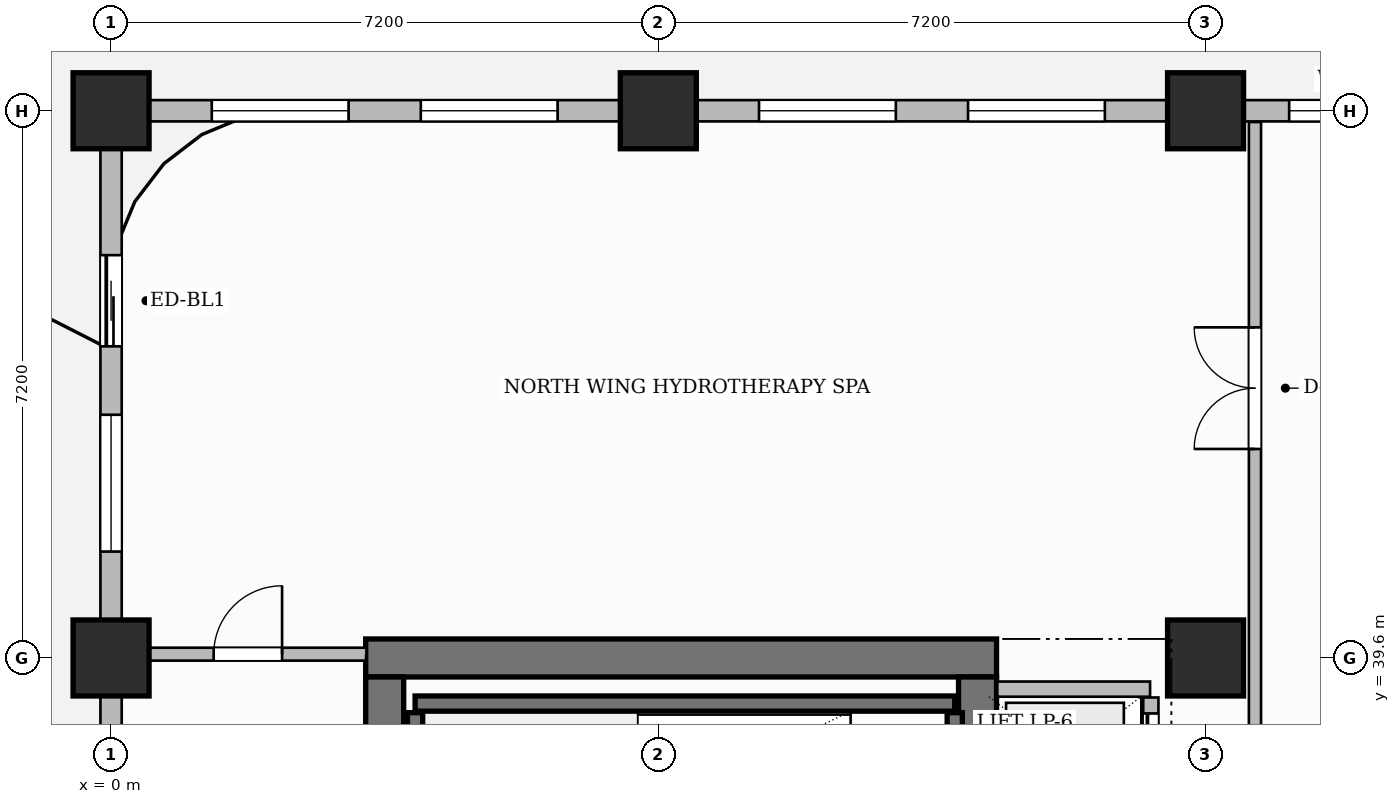
"""IFC4 building model, lengths in metres.
Left out: names, types, materials, properties, quantities, classifications, styles, units other than length and angle.
Written with IfcOpenShell. Run it as: python <this file> out.ifc"""

import sys

from ifc_helpers import new_model, si_unit, direction, frame, frame_2d, origin, origin_2d, place, context, subcontext, project, spatial, rectangle, extrude, source, transform, mapped, element, fill, save


model = new_model("IFC4")
c1 = context("Model", 3, precision=1e-05, world=origin(), true_north=direction((0.0, 1.0)))
c2 = subcontext(c1, "Body", "Model", "MODEL_VIEW")
j1 = project(units=[si_unit("LENGTHUNIT", "METRE"), si_unit("PLANEANGLEUNIT", "RADIAN")], contexts=[c1])
p1 = place(None, origin())
s1 = spatial("IfcSite", under=j1, at=p1, CompositionType="ELEMENT")
p2 = place(p1, origin())
s2 = spatial("IfcBuilding", under=s1, at=p2, CompositionType="ELEMENT")
p3 = place(p2, frame((0.0, 0.0, 150.3)))
s3 = spatial("IfcBuildingStorey", under=s2, at=p3, CompositionType="ELEMENT", Elevation=150.3)
p4 = place(p3, frame((3.35, 39.6, 0.0), z_axis=(0.0, 0.0, 1.0), x_axis=(1.0, 0.0, 0.0)))
e1 = element("IfcWall", 1, at=p4, inside=s3, PredefinedType="SHEAR", context=c2, shape_type="SweptSolid", body=[
    extrude(rectangle(XDim=8.3, YDim=0.5, at=frame_2d((4.15, 0.0))), origin(), (0.0, 0.0, 1.0), 3.85),
])
p5 = place(p3, frame((3.6, 25.45, 0.0), z_axis=(0.0, 0.0, 1.0), x_axis=(0.0, 1.0, 0.0)))
e2 = element("IfcWall", 2, at=p5, inside=s3, PredefinedType="SHEAR", context=c2, shape_type="SweptSolid", body=[
    extrude(rectangle(XDim=13.9, YDim=0.5, at=frame_2d((6.95, 0.0))), origin(), (0.0, 0.0, 1.0), 3.85),
])
p6 = place(p3, frame((11.4, 25.45, 0.0), z_axis=(0.0, 0.0, 1.0), x_axis=(0.0, 1.0, 0.0)))
e3 = element("IfcWall", 3, at=p6, inside=s3, PredefinedType="SHEAR", context=c2, shape_type="SweptSolid", body=[
    extrude(rectangle(XDim=13.9, YDim=0.5, at=frame_2d((6.95, 0.0))), origin(), (0.0, 0.0, 1.0), 3.85),
])
p7 = place(p6, frame((6.52, 0.0, 0.0)))
e4 = element("IfcOpeningElement", 4, at=p7, cuts=e3, PredefinedType="OPENING", context=c2, shape_type="SweptSolid", body=[
    extrude(rectangle(XDim=1.5, YDim=2.2, at=frame_2d((0.75, 1.1))), frame((0.0, 0.26, 0.0), z_axis=(0.0, -1.0, 0.0), x_axis=(1.0, 0.0, 0.0)), (0.0, 0.0, 1.0), 0.52),
])
m1 = source(origin(), c2, "Body", "SweptSolid", [
    extrude(rectangle(XDim=1.0, YDim=1.0, at=origin_2d()), origin(), (0.0, 0.0, 1.0), 3.85),
])
for number, where, z_axis, x_axis in (
    (5, (0.0, 39.6, 0.0), (0.0, 0.0, 1.0), (1.0, 0.0, 0.0)),
    (6, (0.0, 46.8, 0.0), (0.0, 0.0, 1.0), (1.0, 0.0, 0.0)),
    (7, (7.2, 46.8, 0.0), (0.0, 0.0, 1.0), (1.0, 0.0, 0.0)),
    (8, (14.4, 39.6, 0.0), (0.0, 0.0, 1.0), (1.0, 0.0, 0.0)),
    (9, (14.4, 46.8, 0.0), (0.0, 0.0, 1.0), (1.0, 0.0, 0.0)),
):
    element("IfcColumn", number, at=place(p3, frame(where, z_axis=z_axis, x_axis=x_axis)), inside=s3, PredefinedType="COLUMN", context=c2, shape_type="MappedRepresentation", body=[
        mapped(m1, transform((0.0, 0.0, 0.0), scale=1.0)),
    ])
p8 = place(p3, frame((4.0, 39.0, 0.0), z_axis=(0.0, 0.0, 1.0), x_axis=(1.0, 0.0, 0.0)))
e10 = element("IfcWall", 10, at=p8, inside=s3, PredefinedType="SHEAR", context=c2, shape_type="SweptSolid", body=[
    extrude(rectangle(XDim=7.1, YDim=0.2, at=frame_2d((3.55, 0.0))), origin(), (0.0, 0.0, 1.0), 3.85),
])
for number, where, z_axis, x_axis in (
    (11, (4.0, 36.18, 0.0), (0.0, 0.0, 1.0), (0.0, 1.0, 0.0)),
    (12, (11.1, 36.18, 0.0), (0.0, 0.0, 1.0), (0.0, 1.0, 0.0)),
):
    element("IfcWall", number, at=place(p3, frame(where, z_axis=z_axis, x_axis=x_axis)), inside=s3, PredefinedType="SHEAR", context=c2, shape_type="SweptSolid", body=[
        extrude(rectangle(XDim=2.7, YDim=0.2, at=frame_2d((1.35, 0.0))), origin(), (0.0, 0.0, 1.0), 3.85),
    ])
p9 = place(p3, frame((11.66, 39.19, 0.0), z_axis=(0.0, 0.0, 1.0), x_axis=(1.0, 0.0, 0.0)))
e13 = element("IfcWall", 13, at=p9, inside=s3, PredefinedType="PARTITIONING", context=c2, shape_type="SweptSolid", body=[
    extrude(rectangle(XDim=2.01, YDim=0.2, at=frame_2d((1.005, 0.0))), origin(), (0.0, 0.0, 1.0), 3.6),
])
p10 = place(p3, frame((13.68, 34.36, 0.0), z_axis=(0.0, 0.0, 1.0), x_axis=(0.0, 1.0, 0.0)))
e14 = element("IfcWall", 14, at=p10, inside=s3, PredefinedType="PARTITIONING", context=c2, shape_type="SweptSolid", body=[
    extrude(rectangle(XDim=4.72, YDim=0.2, at=frame_2d((2.36, 0.0))), origin(), (0.0, 0.0, 1.0), 3.6),
])
p11 = place(p10, frame((0.21, 0.0, 0.0)))
e15 = element("IfcOpeningElement", 15, at=p11, cuts=e14, PredefinedType="OPENING", context=c2, shape_type="SweptSolid", body=[
    extrude(rectangle(XDim=1.1, YDim=2.2, at=frame_2d((0.55, 1.1))), frame((0.0, 0.11, 0.0), z_axis=(0.0, -1.0, 0.0), x_axis=(1.0, 0.0, 0.0)), (0.0, 0.0, 1.0), 0.22),
])
p12 = place(p10, frame((1.81, 0.0, 0.0)))
e16 = element("IfcOpeningElement", 16, at=p12, cuts=e14, PredefinedType="OPENING", context=c2, shape_type="SweptSolid", body=[
    extrude(rectangle(XDim=1.1, YDim=2.2, at=frame_2d((0.55, 1.1))), frame((0.0, 0.11, 0.0), z_axis=(0.0, -1.0, 0.0), x_axis=(1.0, 0.0, 0.0)), (0.0, 0.0, 1.0), 0.22),
])
p13 = place(p10, frame((3.41, 0.0, 0.0)))
e17 = element("IfcOpeningElement", 17, at=p13, cuts=e14, PredefinedType="OPENING", context=c2, shape_type="SweptSolid", body=[
    extrude(rectangle(XDim=1.1, YDim=2.2, at=frame_2d((0.55, 1.1))), frame((0.0, 0.11, 0.0), z_axis=(0.0, -1.0, 0.0), x_axis=(1.0, 0.0, 0.0)), (0.0, 0.0, 1.0), 0.22),
])
p14 = place(p3, frame((0.24, 39.65, 0.0), z_axis=(0.0, 0.0, 1.0), x_axis=(1.0, 0.0, 0.0)))
e18 = element("IfcWall", 18, at=p14, inside=s3, PredefinedType="PARTITIONING", context=c2, shape_type="SweptSolid", body=[
    extrude(rectangle(XDim=3.12, YDim=0.17, at=frame_2d((1.56, 0.0))), origin(), (0.0, 0.0, 1.0), 3.6),
])
p15 = place(p14, frame((1.11, 0.0, 0.0)))
e19 = element("IfcOpeningElement", 19, at=p15, cuts=e18, PredefinedType="OPENING", context=c2, shape_type="SweptSolid", body=[
    extrude(rectangle(XDim=0.9, YDim=2.15, at=frame_2d((0.45, 1.075))), frame((0.0, 0.095, 0.0), z_axis=(0.0, -1.0, 0.0), x_axis=(1.0, 0.0, 0.0)), (0.0, 0.0, 1.0), 0.19),
])
p16 = place(p3, frame((15.05, 34.34, 0.0), z_axis=(0.0, 0.0, 1.0), x_axis=(0.0, 1.0, 0.0)))
e20 = element("IfcWall", 20, at=p16, inside=s3, PredefinedType="PARTITIONING", context=c2, shape_type="SweptSolid", body=[
    extrude(rectangle(XDim=12.312, YDim=0.16, at=frame_2d((6.156, 0.0))), origin(), (0.0, 0.0, 1.0), 3.6),
])
p17 = place(p16, frame((8.01, 0.0, 0.0)))
e21 = element("IfcOpeningElement", 21, at=p17, cuts=e20, PredefinedType="OPENING", context=c2, shape_type="SweptSolid", body=[
    extrude(rectangle(XDim=1.6, YDim=2.4, at=frame_2d((0.8, 1.2))), frame((0.0, 0.09, 0.0), z_axis=(0.0, -1.0, 0.0), x_axis=(1.0, 0.0, 0.0)), (0.0, 0.0, 1.0), 0.18),
])
p18 = place(p3, frame((0.0, 25.25, 0.0), z_axis=(0.0, 0.0, 1.0), x_axis=(0.0, 1.0, 0.0)))
e22 = element("IfcWall", 22, at=p18, inside=s3, PredefinedType="SOLIDWALL", context=c2, shape_type="SweptSolid", body=[
    extrude(rectangle(XDim=21.5, YDim=0.28, at=frame_2d((10.75, 0.0))), origin(), (0.0, 0.0, 1.0), 3.085),
])
p19 = place(p18, frame((18.45, 0.0, 0.0)))
e23 = element("IfcOpeningElement", 23, at=p19, cuts=e22, PredefinedType="OPENING", context=c2, shape_type="SweptSolid", body=[
    extrude(rectangle(XDim=1.2, YDim=2.2, at=frame_2d((0.6, 1.1))), frame((0.0, 0.15, 0.0), z_axis=(0.0, -1.0, 0.0), x_axis=(1.0, 0.0, 0.0)), (0.0, 0.0, 1.0), 0.3),
])
p20 = place(p18, frame((0.8, 0.0, 0.0)))
e24 = element("IfcOpeningElement", 24, at=p20, cuts=e22, PredefinedType="OPENING", context=c2, shape_type="SweptSolid", body=[
    extrude(rectangle(XDim=1.2, YDim=2.2, at=frame_2d((0.6, 1.1))), frame((0.0, 0.15, 0.0), z_axis=(0.0, -1.0, 0.0), x_axis=(1.0, 0.0, 0.0)), (0.0, 0.0, 1.0), 0.3),
])
p21 = place(p18, frame((3.425, 0.0, 0.8)))
e25 = element("IfcOpeningElement", 25, at=p21, cuts=e22, PredefinedType="OPENING", context=c2, shape_type="SweptSolid", body=[
    extrude(rectangle(XDim=1.8, YDim=1.85, at=frame_2d((0.9, 0.925))), frame((0.0, 0.15, 0.0), z_axis=(0.0, -1.0, 0.0), x_axis=(1.0, 0.0, 0.0)), (0.0, 0.0, 1.0), 0.3),
])
p22 = place(p18, frame((8.475, 0.0, 0.8)))
e26 = element("IfcOpeningElement", 26, at=p22, cuts=e22, PredefinedType="OPENING", context=c2, shape_type="SweptSolid", body=[
    extrude(rectangle(XDim=1.8, YDim=1.85, at=frame_2d((0.9, 0.925))), frame((0.0, 0.15, 0.0), z_axis=(0.0, -1.0, 0.0), x_axis=(1.0, 0.0, 0.0)), (0.0, 0.0, 1.0), 0.3),
])
p23 = place(p18, frame((11.225, 0.0, 0.8)))
e27 = element("IfcOpeningElement", 27, at=p23, cuts=e22, PredefinedType="OPENING", context=c2, shape_type="SweptSolid", body=[
    extrude(rectangle(XDim=1.8, YDim=1.85, at=frame_2d((0.9, 0.925))), frame((0.0, 0.15, 0.0), z_axis=(0.0, -1.0, 0.0), x_axis=(1.0, 0.0, 0.0)), (0.0, 0.0, 1.0), 0.3),
])
p24 = place(p18, frame((15.75, 0.0, 0.8)))
e28 = element("IfcOpeningElement", 28, at=p24, cuts=e22, PredefinedType="OPENING", context=c2, shape_type="SweptSolid", body=[
    extrude(rectangle(XDim=1.8, YDim=1.85, at=frame_2d((0.9, 0.925))), frame((0.0, 0.15, 0.0), z_axis=(0.0, -1.0, 0.0), x_axis=(1.0, 0.0, 0.0)), (0.0, 0.0, 1.0), 0.3),
])
p25 = place(p3, frame((0.0, 46.8, 0.0), z_axis=(0.0, 0.0, 1.0), x_axis=(1.0, 0.0, 0.0)))
e29 = element("IfcWall", 29, at=p25, inside=s3, PredefinedType="SOLIDWALL", context=c2, shape_type="SweptSolid", body=[
    extrude(rectangle(XDim=18.0, YDim=0.28, at=frame_2d((9.0, 0.0))), origin(), (0.0, 0.0, 1.0), 3.085),
])
p26 = place(p25, frame((1.325, 0.0, 0.8)))
e30 = element("IfcOpeningElement", 30, at=p26, cuts=e29, PredefinedType="OPENING", context=c2, shape_type="SweptSolid", body=[
    extrude(rectangle(XDim=1.8, YDim=1.85, at=frame_2d((0.9, 0.925))), frame((0.0, 0.15, 0.0), z_axis=(0.0, -1.0, 0.0), x_axis=(1.0, 0.0, 0.0)), (0.0, 0.0, 1.0), 0.3),
])
p27 = place(p25, frame((4.075, 0.0, 0.8)))
e31 = element("IfcOpeningElement", 31, at=p27, cuts=e29, PredefinedType="OPENING", context=c2, shape_type="SweptSolid", body=[
    extrude(rectangle(XDim=1.8, YDim=1.85, at=frame_2d((0.9, 0.925))), frame((0.0, 0.15, 0.0), z_axis=(0.0, -1.0, 0.0), x_axis=(1.0, 0.0, 0.0)), (0.0, 0.0, 1.0), 0.3),
])
p28 = place(p25, frame((8.525, 0.0, 0.8)))
e32 = element("IfcOpeningElement", 32, at=p28, cuts=e29, PredefinedType="OPENING", context=c2, shape_type="SweptSolid", body=[
    extrude(rectangle(XDim=1.8, YDim=1.85, at=frame_2d((0.9, 0.925))), frame((0.0, 0.15, 0.0), z_axis=(0.0, -1.0, 0.0), x_axis=(1.0, 0.0, 0.0)), (0.0, 0.0, 1.0), 0.3),
])
p29 = place(p25, frame((11.275, 0.0, 0.8)))
e33 = element("IfcOpeningElement", 33, at=p29, cuts=e29, PredefinedType="OPENING", context=c2, shape_type="SweptSolid", body=[
    extrude(rectangle(XDim=1.8, YDim=1.85, at=frame_2d((0.9, 0.925))), frame((0.0, 0.15, 0.0), z_axis=(0.0, -1.0, 0.0), x_axis=(1.0, 0.0, 0.0)), (0.0, 0.0, 1.0), 0.3),
])
p30 = place(p25, frame((15.5, 0.0, 0.8)))
e34 = element("IfcOpeningElement", 34, at=p30, cuts=e29, PredefinedType="OPENING", context=c2, shape_type="SweptSolid", body=[
    extrude(rectangle(XDim=1.4, YDim=1.85, at=frame_2d((0.7, 0.925))), frame((0.0, 0.15, 0.0), z_axis=(0.0, -1.0, 0.0), x_axis=(1.0, 0.0, 0.0)), (0.0, 0.0, 1.0), 0.3),
])
m2 = source(origin(), c2, "Body", "SweptSolid", [
    extrude(rectangle(XDim=0.9, YDim=2.15, at=frame_2d((0.45, 1.075))), frame((0.0, 0.025, 0.0), z_axis=(0.0, -1.0, 0.0), x_axis=(1.0, 0.0, 0.0)), (0.0, 0.0, 1.0), 0.05),
])
p31 = place(p15, origin())
e35 = element("IfcDoor", 35, at=p31, inside=s3, OperationType="SINGLE_SWING_RIGHT", PredefinedType="DOOR", context=c2, shape_type="MappedRepresentation", body=[
    mapped(m2, transform((0.0, 0.0, 0.0), scale=1.0)),
])
fill(e19, e35)
m3 = source(origin(), c2, "Body", "SweptSolid", [
    extrude(rectangle(XDim=1.6, YDim=2.4, at=frame_2d((0.8, 1.2))), frame((0.0, 0.025, 0.0), z_axis=(0.0, -1.0, 0.0), x_axis=(1.0, 0.0, 0.0)), (0.0, 0.0, 1.0), 0.05),
])
p32 = place(p17, origin())
e36 = element("IfcDoor", 36, at=p32, inside=s3, OperationType="DOUBLE_DOOR_SINGLE_SWING", PredefinedType="DOOR", context=c2, shape_type="MappedRepresentation", body=[
    mapped(m3, transform((0.0, 0.0, 0.0), scale=1.0)),
])
fill(e21, e36)
m4 = source(origin(), c2, "Body", "SweptSolid", [
    extrude(rectangle(XDim=1.1, YDim=2.2, at=frame_2d((0.55, 1.1))), frame((0.0, 0.025, 0.0), z_axis=(0.0, -1.0, 0.0), x_axis=(1.0, 0.0, 0.0)), (0.0, 0.0, 1.0), 0.05),
])
p33 = place(p13, origin())
e37 = element("IfcDoor", 37, at=p33, inside=s3, OperationType="SLIDING_TO_LEFT", PredefinedType="DOOR", context=c2, shape_type="MappedRepresentation", body=[
    mapped(m4, transform((0.0, 0.0, 0.0), scale=1.0)),
])
fill(e17, e37)
m5 = source(origin(), c2, "Body", "SweptSolid", [
    extrude(rectangle(XDim=1.2, YDim=2.2, at=frame_2d((0.6, 1.1))), frame((0.0, 0.025, 0.0), z_axis=(0.0, -1.0, 0.0), x_axis=(1.0, 0.0, 0.0)), (0.0, 0.0, 1.0), 0.05),
])
p34 = place(p19, origin())
e38 = element("IfcDoor", 38, at=p34, inside=s3, OperationType="SLIDING_TO_LEFT", PredefinedType="DOOR", context=c2, shape_type="MappedRepresentation", body=[
    mapped(m5, transform((0.0, 0.0, 0.0), scale=1.0)),
])
fill(e23, e38)
m6 = source(origin(), c2, "Body", "SweptSolid", [
    extrude(rectangle(XDim=1.8, YDim=1.85, at=frame_2d((0.9, 0.925))), frame((0.0, 0.03, 0.0), z_axis=(0.0, -1.0, 0.0), x_axis=(1.0, 0.0, 0.0)), (0.0, 0.0, 1.0), 0.06),
])
p35 = place(p24, origin())
e39 = element("IfcWindow", 39, at=p35, inside=s3, PartitioningType="DOUBLE_PANEL_VERTICAL", PredefinedType="WINDOW", context=c2, shape_type="MappedRepresentation", body=[
    mapped(m6, transform((0.0, 0.0, 0.0), scale=1.0)),
])
fill(e28, e39)
p36 = place(p26, origin())
e40 = element("IfcWindow", 40, at=p36, inside=s3, PartitioningType="DOUBLE_PANEL_VERTICAL", PredefinedType="WINDOW", context=c2, shape_type="MappedRepresentation", body=[
    mapped(m6, transform((0.0, 0.0, 0.0), scale=1.0)),
])
fill(e30, e40)
p37 = place(p27, origin())
e41 = element("IfcWindow", 41, at=p37, inside=s3, PartitioningType="DOUBLE_PANEL_VERTICAL", PredefinedType="WINDOW", context=c2, shape_type="MappedRepresentation", body=[
    mapped(m6, transform((0.0, 0.0, 0.0), scale=1.0)),
])
fill(e31, e41)
p38 = place(p28, origin())
e42 = element("IfcWindow", 42, at=p38, inside=s3, PartitioningType="DOUBLE_PANEL_VERTICAL", PredefinedType="WINDOW", context=c2, shape_type="MappedRepresentation", body=[
    mapped(m6, transform((0.0, 0.0, 0.0), scale=1.0)),
])
fill(e32, e42)
p39 = place(p29, origin())
e43 = element("IfcWindow", 43, at=p39, inside=s3, PartitioningType="DOUBLE_PANEL_VERTICAL", PredefinedType="WINDOW", context=c2, shape_type="MappedRepresentation", body=[
    mapped(m6, transform((0.0, 0.0, 0.0), scale=1.0)),
])
fill(e33, e43)
m7 = source(origin(), c2, "Body", "SweptSolid", [
    extrude(rectangle(XDim=1.4, YDim=1.85, at=frame_2d((0.7, 0.925))), frame((0.0, 0.03, 0.0), z_axis=(0.0, -1.0, 0.0), x_axis=(1.0, 0.0, 0.0)), (0.0, 0.0, 1.0), 0.06),
])
p40 = place(p30, origin())
e44 = element("IfcWindow", 44, at=p40, inside=s3, PartitioningType="SINGLE_PANEL", PredefinedType="WINDOW", context=c2, shape_type="MappedRepresentation", body=[
    mapped(m7, transform((0.0, 0.0, 0.0), scale=1.0)),
])
fill(e34, e44)
save(model, sys.argv[1])
